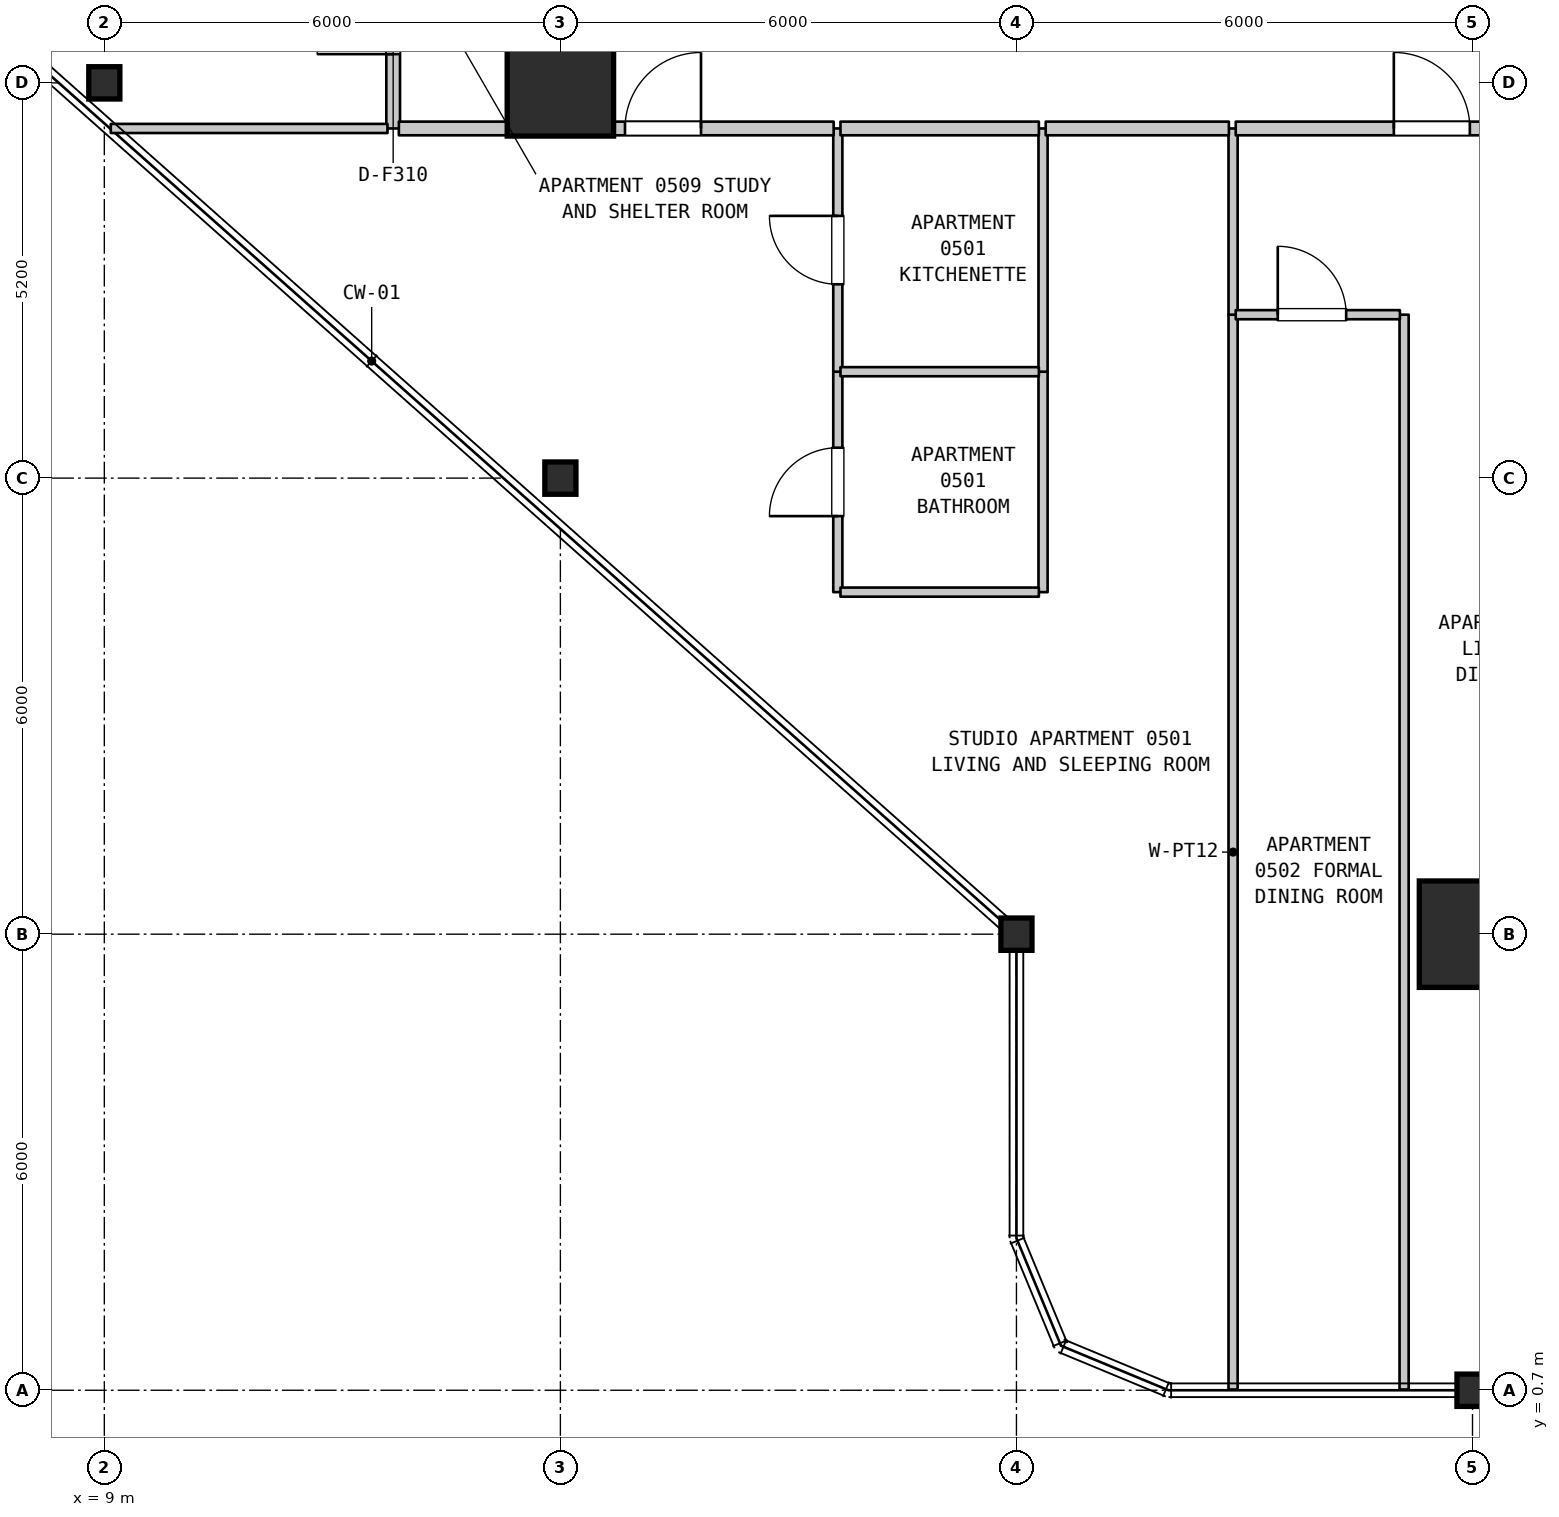
"""IFC4 building model, lengths in metres.
Left out: names, types, materials, properties, quantities, classifications, styles, units other than length and angle.
Written with IfcOpenShell. Run it as: python <this file> out.ifc"""

import sys

from ifc_helpers import new_model, si_unit, direction, frame, frame_2d, origin, origin_2d, place, context, subcontext, project, spatial, rectangle, i_section, extrude, element, fill, save


model = new_model("IFC4")
c1 = context("Model", 3, precision=1e-05, world=origin(), true_north=direction((0.0, 1.0)))
c2 = subcontext(c1, "Body", "Model", "MODEL_VIEW")
j1 = project(units=[si_unit("LENGTHUNIT", "METRE"), si_unit("PLANEANGLEUNIT", "RADIAN")], contexts=[c1])
p1 = place(None, origin())
s1 = spatial("IfcSite", under=j1, at=p1, CompositionType="ELEMENT")
p2 = place(p1, origin())
s2 = spatial("IfcBuilding", under=s1, at=p2, CompositionType="ELEMENT")
p3 = place(p2, frame((0.0, 0.0, 27.7)))
s3 = spatial("IfcBuildingStorey", under=s2, at=p3, CompositionType="ELEMENT", Elevation=27.7)
for number, where, z_axis, x_axis in (
    (1, (9.0, 17.9, 0.0), (0.0, 0.0, 1.0), (1.0, 0.0, 0.0)),
    (2, (15.0, 12.7, 0.0), (0.0, 0.0, 1.0), (1.0, 0.0, 0.0)),
):
    element("IfcColumn", number, at=place(p3, frame(where, z_axis=z_axis, x_axis=x_axis)), inside=s3, PredefinedType="COLUMN", context=c2, shape_type="SweptSolid", body=[
        extrude(i_section(OverallWidth=0.409, OverallDepth=0.425, WebThickness=0.032, FlangeThickness=0.052, FilletRadius=0.015, at=origin_2d()), origin(), (0.0, 0.0, 1.0), 3.7),
    ])
p4 = place(p3, frame((15.0, 17.9, 0.0), z_axis=(0.0, 0.0, 1.0), x_axis=(1.0, 0.0, 0.0)))
e3 = element("IfcColumn", 3, at=p4, inside=s3, PredefinedType="COLUMN", context=c2, shape_type="SweptSolid", body=[
    extrude(rectangle(XDim=1.4, YDim=1.4, at=origin_2d()), origin(), (0.0, 0.0, 1.0), 3.7),
])
for number, where, z_axis, x_axis in (
    (4, (21.0, 6.7, 0.0), (0.0, 0.0, 1.0), (1.0, 0.0, 0.0)),
    (5, (27.0, 0.7, 0.0), (0.0, 0.0, 1.0), (1.0, 0.0, 0.0)),
):
    element("IfcColumn", number, at=place(p3, frame(where, z_axis=z_axis, x_axis=x_axis)), inside=s3, PredefinedType="COLUMN", context=c2, shape_type="SweptSolid", body=[
        extrude(i_section(OverallWidth=0.409, OverallDepth=0.425, WebThickness=0.032, FlangeThickness=0.052, FilletRadius=0.015, at=origin_2d()), origin(), (0.0, 0.0, 1.0), 3.7),
    ])
p5 = place(p3, frame((27.0, 6.7, 0.0), z_axis=(0.0, 0.0, 1.0), x_axis=(1.0, 0.0, 0.0)))
e6 = element("IfcColumn", 6, at=p5, inside=s3, PredefinedType="COLUMN", context=c2, shape_type="SweptSolid", body=[
    extrude(rectangle(XDim=1.4, YDim=1.4, at=origin_2d()), origin(), (0.0, 0.0, 1.0), 3.7),
])
p6 = place(p3, frame((12.8, 17.3, 0.0), z_axis=(0.0, 0.0, 1.0), x_axis=(0.0, 1.0, 0.0)))
e7 = element("IfcWall", 7, at=p6, inside=s3, PredefinedType="STANDARD", context=c2, shape_type="SweptSolid", body=[
    extrude(rectangle(XDim=3.1, YDim=0.18, at=frame_2d((1.55, 0.0))), origin(), (0.0, 0.0, 1.0), 3.385),
])
p7 = place(p6, frame((0.978, 0.0, 0.0)))
e8 = element("IfcOpeningElement", 8, at=p7, cuts=e7, PredefinedType="OPENING", context=c2, shape_type="SweptSolid", body=[
    extrude(rectangle(XDim=1.0, YDim=2.15, at=frame_2d((0.5, 1.075))), frame((0.0, 0.1, 0.0), z_axis=(0.0, -1.0, 0.0), x_axis=(1.0, 0.0, 0.0)), (0.0, 0.0, 1.0), 0.2),
])
p8 = place(p3, frame((18.65, 11.2, 0.0), z_axis=(0.0, 0.0, 1.0), x_axis=(0.0, 1.0, 0.0)))
e9 = element("IfcWall", 9, at=p8, inside=s3, PredefinedType="PARTITIONING", context=c2, shape_type="SweptSolid", body=[
    extrude(rectangle(XDim=2.9, YDim=0.12, at=frame_2d((1.45, 0.0))), origin(), (0.0, 0.0, 1.0), 3.385),
])
p9 = place(p8, frame((1.0, 0.0, 0.0)))
e10 = element("IfcOpeningElement", 10, at=p9, cuts=e9, PredefinedType="OPENING", context=c2, shape_type="SweptSolid", body=[
    extrude(rectangle(XDim=0.9, YDim=2.1, at=frame_2d((0.45, 1.05))), frame((0.0, 0.07, 0.0), z_axis=(0.0, -1.0, 0.0), x_axis=(1.0, 0.0, 0.0)), (0.0, 0.0, 1.0), 0.14),
])
p10 = place(p3, frame((18.65, 14.1, 0.0), z_axis=(0.0, 0.0, 1.0), x_axis=(0.0, 1.0, 0.0)))
e11 = element("IfcWall", 11, at=p10, inside=s3, PredefinedType="PARTITIONING", context=c2, shape_type="SweptSolid", body=[
    extrude(rectangle(XDim=3.2, YDim=0.12, at=frame_2d((1.6, 0.0))), origin(), (0.0, 0.0, 1.0), 3.385),
])
p11 = place(p10, frame((1.15, 0.0, 0.0)))
e12 = element("IfcOpeningElement", 12, at=p11, cuts=e11, PredefinedType="OPENING", context=c2, shape_type="SweptSolid", body=[
    extrude(rectangle(XDim=0.9, YDim=2.15, at=frame_2d((0.45, 1.075))), frame((0.0, 0.07, 0.0), z_axis=(0.0, -1.0, 0.0), x_axis=(1.0, 0.0, 0.0)), (0.0, 0.0, 1.0), 0.14),
])
p12 = place(p3, frame((21.35, 11.2, 0.0), z_axis=(0.0, 0.0, 1.0), x_axis=(0.0, 1.0, 0.0)))
e13 = element("IfcWall", 13, at=p12, inside=s3, PredefinedType="PARTITIONING", context=c2, shape_type="SweptSolid", body=[
    extrude(rectangle(XDim=2.9, YDim=0.12, at=frame_2d((1.45, 0.0))), origin(), (0.0, 0.0, 1.0), 3.385),
])
p13 = place(p3, frame((21.35, 14.1, 0.0), z_axis=(0.0, 0.0, 1.0), x_axis=(0.0, 1.0, 0.0)))
e14 = element("IfcWall", 14, at=p13, inside=s3, PredefinedType="PARTITIONING", context=c2, shape_type="SweptSolid", body=[
    extrude(rectangle(XDim=3.2, YDim=0.12, at=frame_2d((1.6, 0.0))), origin(), (0.0, 0.0, 1.0), 3.385),
])
p14 = place(p3, frame((23.85, 0.71, 0.0), z_axis=(0.0, 0.0, 1.0), x_axis=(0.0, 1.0, 0.0)))
e15 = element("IfcWall", 15, at=p14, inside=s3, PredefinedType="PARTITIONING", context=c2, shape_type="SweptSolid", body=[
    extrude(rectangle(XDim=14.14, YDim=0.12, at=frame_2d((7.07, 0.0))), origin(), (0.0, 0.0, 1.0), 3.385),
])
p15 = place(p3, frame((23.85, 14.85, 0.0), z_axis=(0.0, 0.0, 1.0), x_axis=(0.0, 1.0, 0.0)))
e16 = element("IfcWall", 16, at=p15, inside=s3, PredefinedType="PARTITIONING", context=c2, shape_type="SweptSolid", body=[
    extrude(rectangle(XDim=2.45, YDim=0.12, at=frame_2d((1.225, 0.0))), origin(), (0.0, 0.0, 1.0), 3.385),
])
p16 = place(p3, frame((26.1, 0.71, 0.0), z_axis=(0.0, 0.0, 1.0), x_axis=(0.0, 1.0, 0.0)))
e17 = element("IfcWall", 17, at=p16, inside=s3, PredefinedType="PARTITIONING", context=c2, shape_type="SweptSolid", body=[
    extrude(rectangle(XDim=14.14, YDim=0.12, at=frame_2d((7.07, 0.0))), origin(), (0.0, 0.0, 1.0), 3.385),
])
for number, where, z_axis, x_axis in (
    (18, (18.685, 11.2, 0.0), (0.0, 0.0, 1.0), (1.0, 0.0, 0.0)),
    (19, (18.685, 14.1, 0.0), (0.0, 0.0, 1.0), (1.0, 0.0, 0.0)),
):
    element("IfcWall", number, at=place(p3, frame(where, z_axis=z_axis, x_axis=x_axis)), inside=s3, PredefinedType="PARTITIONING", context=c2, shape_type="SweptSolid", body=[
        extrude(rectangle(XDim=2.61, YDim=0.12, at=frame_2d((1.305, 0.0))), origin(), (0.0, 0.0, 1.0), 3.385),
    ])
p17 = place(p3, frame((23.885, 14.85, 0.0), z_axis=(0.0, 0.0, 1.0), x_axis=(1.0, 0.0, 0.0)))
e20 = element("IfcWall", 20, at=p17, inside=s3, PredefinedType="PARTITIONING", context=c2, shape_type="SweptSolid", body=[
    extrude(rectangle(XDim=2.16, YDim=0.12, at=frame_2d((1.08, 0.0))), origin(), (0.0, 0.0, 1.0), 3.385),
])
p18 = place(p17, frame((0.553, 0.0, 0.0)))
e21 = element("IfcOpeningElement", 21, at=p18, cuts=e20, PredefinedType="OPENING", context=c2, shape_type="SweptSolid", body=[
    extrude(rectangle(XDim=0.9, YDim=2.15, at=frame_2d((0.45, 1.075))), frame((0.0, 0.07, 0.0), z_axis=(0.0, -1.0, 0.0), x_axis=(1.0, 0.0, 0.0)), (0.0, 0.0, 1.0), 0.14),
])
p19 = place(p3, frame((9.085, 17.3, 0.0), z_axis=(0.0, 0.0, 1.0), x_axis=(1.0, 0.0, 0.0)))
e22 = element("IfcWall", 22, at=p19, inside=s3, PredefinedType="PARTITIONING", context=c2, shape_type="SweptSolid", body=[
    extrude(rectangle(XDim=3.64, YDim=0.12, at=frame_2d((1.82, 0.0))), origin(), (0.0, 0.0, 1.0), 3.385),
])
p20 = place(p3, frame((12.875, 17.3, 0.0), z_axis=(0.0, 0.0, 1.0), x_axis=(1.0, 0.0, 0.0)))
e23 = element("IfcWall", 23, at=p20, inside=s3, PredefinedType="STANDARD", context=c2, shape_type="SweptSolid", body=[
    extrude(rectangle(XDim=5.72, YDim=0.18, at=frame_2d((2.86, 0.0))), origin(), (0.0, 0.0, 1.0), 3.385),
])
p21 = place(p20, frame((2.975, 0.0, 0.0)))
e24 = element("IfcOpeningElement", 24, at=p21, cuts=e23, PredefinedType="OPENING", context=c2, shape_type="SweptSolid", body=[
    extrude(rectangle(XDim=1.0, YDim=2.15, at=frame_2d((0.5, 1.075))), frame((0.0, 0.1, 0.0), z_axis=(0.0, -1.0, 0.0), x_axis=(1.0, 0.0, 0.0)), (0.0, 0.0, 1.0), 0.2),
])
p22 = place(p3, frame((18.685, 17.3, 0.0), z_axis=(0.0, 0.0, 1.0), x_axis=(1.0, 0.0, 0.0)))
e25 = element("IfcWall", 25, at=p22, inside=s3, PredefinedType="STANDARD", context=c2, shape_type="SweptSolid", body=[
    extrude(rectangle(XDim=2.61, YDim=0.18, at=frame_2d((1.305, 0.0))), origin(), (0.0, 0.0, 1.0), 3.385),
])
p23 = place(p3, frame((21.385, 17.3, 0.0), z_axis=(0.0, 0.0, 1.0), x_axis=(1.0, 0.0, 0.0)))
e26 = element("IfcWall", 26, at=p23, inside=s3, PredefinedType="STANDARD", context=c2, shape_type="SweptSolid", body=[
    extrude(rectangle(XDim=2.41, YDim=0.18, at=frame_2d((1.205, 0.0))), origin(), (0.0, 0.0, 1.0), 3.385),
])
p24 = place(p3, frame((23.885, 17.3, 0.0), z_axis=(0.0, 0.0, 1.0), x_axis=(1.0, 0.0, 0.0)))
e27 = element("IfcWall", 27, at=p24, inside=s3, PredefinedType="STANDARD", context=c2, shape_type="SweptSolid", body=[
    extrude(rectangle(XDim=5.095, YDim=0.18, at=frame_2d((2.547, 0.0))), origin(), (0.0, 0.0, 1.0), 3.385),
])
p25 = place(p24, frame((2.08, 0.0, 0.0)))
e28 = element("IfcOpeningElement", 28, at=p25, cuts=e27, PredefinedType="OPENING", context=c2, shape_type="SweptSolid", body=[
    extrude(rectangle(XDim=1.0, YDim=2.15, at=frame_2d((0.5, 1.075))), frame((0.0, 0.1, 0.0), z_axis=(0.0, -1.0, 0.0), x_axis=(1.0, 0.0, 0.0)), (0.0, 0.0, 1.0), 0.2),
])
p26 = place(p7, origin())
e29 = element("IfcDoor", 29, at=p26, inside=s3, OperationType="SINGLE_SWING_LEFT", PredefinedType="DOOR", context=c2, shape_type="SweptSolid", body=[
    extrude(rectangle(XDim=1.0, YDim=2.15, at=frame_2d((0.5, 1.075))), frame((0.0, 0.025, 0.0), z_axis=(0.0, -1.0, 0.0), x_axis=(1.0, 0.0, 0.0)), (0.0, 0.0, 1.0), 0.05),
])
fill(e8, e29)
p27 = place(p9, origin())
e30 = element("IfcDoor", 30, at=p27, inside=s3, OperationType="SINGLE_SWING_LEFT", PredefinedType="DOOR", context=c2, shape_type="SweptSolid", body=[
    extrude(rectangle(XDim=0.9, YDim=2.1, at=frame_2d((0.45, 1.05))), frame((0.0, 0.025, 0.0), z_axis=(0.0, -1.0, 0.0), x_axis=(1.0, 0.0, 0.0)), (0.0, 0.0, 1.0), 0.05),
])
fill(e10, e30)
p28 = place(p11, origin())
e31 = element("IfcDoor", 31, at=p28, inside=s3, OperationType="SINGLE_SWING_RIGHT", PredefinedType="DOOR", context=c2, shape_type="SweptSolid", body=[
    extrude(rectangle(XDim=0.9, YDim=2.15, at=frame_2d((0.45, 1.075))), frame((0.0, 0.025, 0.0), z_axis=(0.0, -1.0, 0.0), x_axis=(1.0, 0.0, 0.0)), (0.0, 0.0, 1.0), 0.05),
])
fill(e12, e31)
p29 = place(p18, origin())
e32 = element("IfcDoor", 32, at=p29, inside=s3, OperationType="SINGLE_SWING_LEFT", PredefinedType="DOOR", context=c2, shape_type="SweptSolid", body=[
    extrude(rectangle(XDim=0.9, YDim=2.15, at=frame_2d((0.45, 1.075))), frame((0.0, 0.025, 0.0), z_axis=(0.0, -1.0, 0.0), x_axis=(1.0, 0.0, 0.0)), (0.0, 0.0, 1.0), 0.05),
])
fill(e21, e32)
p30 = place(p21, origin())
e33 = element("IfcDoor", 33, at=p30, inside=s3, OperationType="SINGLE_SWING_RIGHT", PredefinedType="DOOR", context=c2, shape_type="SweptSolid", body=[
    extrude(rectangle(XDim=1.0, YDim=2.15, at=frame_2d((0.5, 1.075))), frame((0.0, 0.025, 0.0), z_axis=(0.0, -1.0, 0.0), x_axis=(1.0, 0.0, 0.0)), (0.0, 0.0, 1.0), 0.05),
])
fill(e24, e33)
p31 = place(p25, origin())
e34 = element("IfcDoor", 34, at=p31, inside=s3, OperationType="SINGLE_SWING_LEFT", PredefinedType="DOOR", context=c2, shape_type="SweptSolid", body=[
    extrude(rectangle(XDim=1.0, YDim=2.15, at=frame_2d((0.5, 1.075))), frame((0.0, 0.025, 0.0), z_axis=(0.0, -1.0, 0.0), x_axis=(1.0, 0.0, 0.0)), (0.0, 0.0, 1.0), 0.05),
])
fill(e28, e34)
save(model, sys.argv[1])
